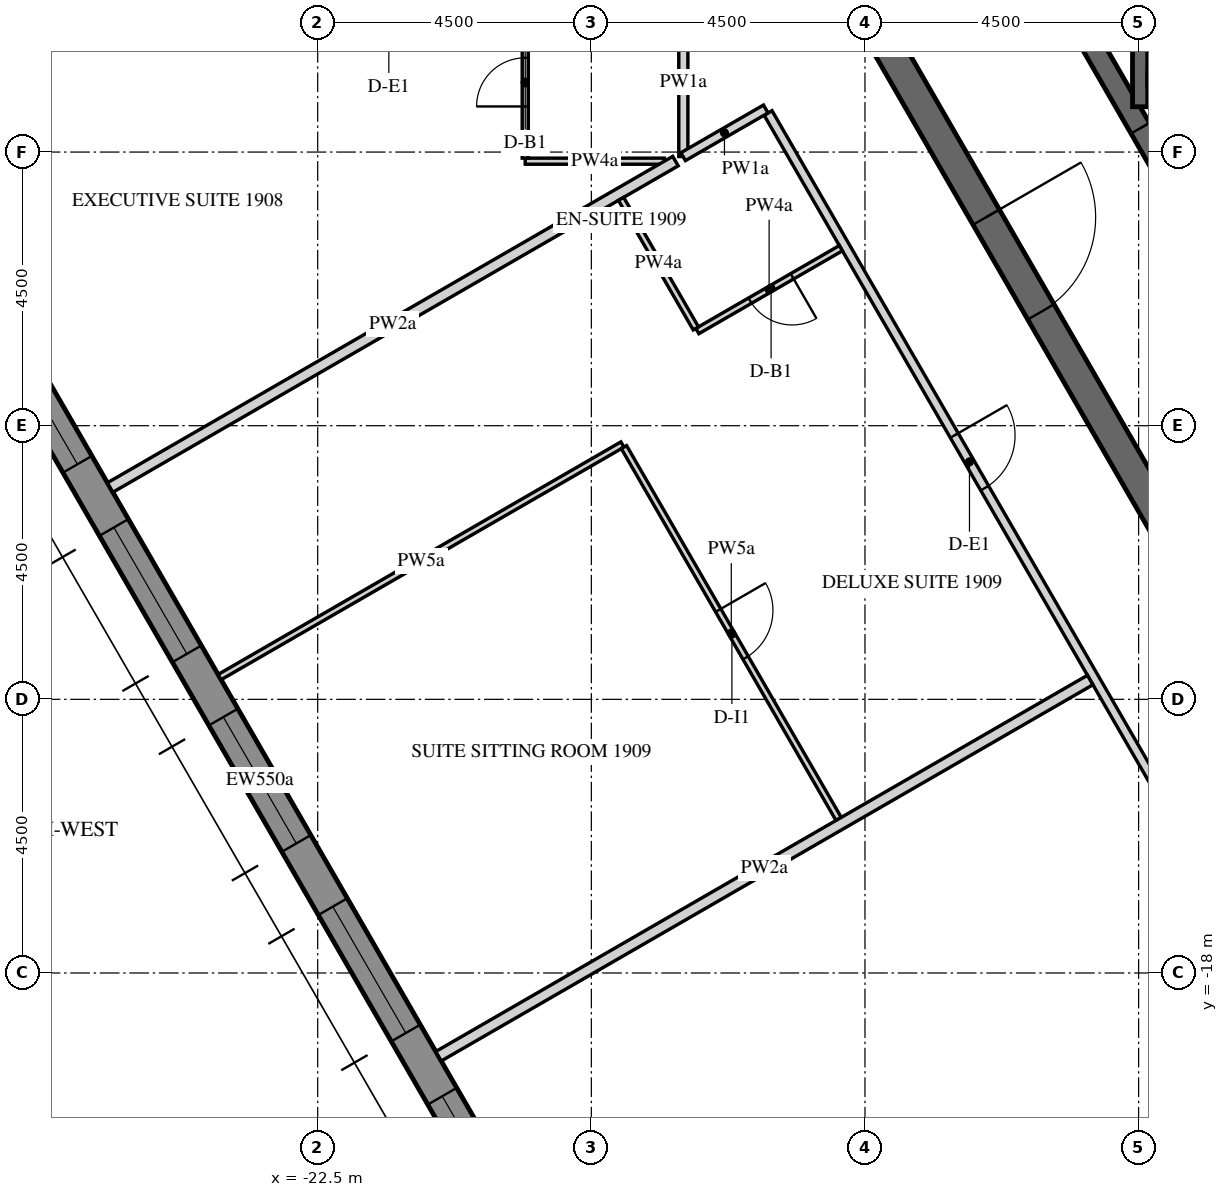
"""IFC4 building model, lengths in metres.
Left out: names, types, materials, properties, quantities, classifications, styles, units other than length and angle.
Written with IfcOpenShell. Run it as: python <this file> out.ifc"""

import sys

from ifc_helpers import new_model, si_unit, direction, frame, frame_2d, origin, place, context, subcontext, project, spatial, polyline, rectangle, outline, extrude, element, fill, save


model = new_model("IFC4")
c1 = context("Model", 3, precision=1e-05, world=origin(), true_north=direction((0.0, 1.0)))
c2 = subcontext(c1, "Body", "Model", "MODEL_VIEW")
j1 = project(units=[si_unit("LENGTHUNIT", "METRE"), si_unit("PLANEANGLEUNIT", "RADIAN")], contexts=[c1])
p1 = place(None, origin())
s1 = spatial("IfcSite", under=j1, at=p1, CompositionType="ELEMENT")
p2 = place(p1, origin())
s2 = spatial("IfcBuilding", under=s1, at=p2, CompositionType="ELEMENT")
p3 = place(p2, frame((0.0, 0.0, 246.3)))
s3 = spatial("IfcBuildingStorey", under=s2, at=p3, CompositionType="ELEMENT", Elevation=246.3)
p4 = place(p3, frame((-30.391, -2.811, -0.15), z_axis=(0.0, 0.0, 1.0), x_axis=(0.499998569178, -0.866026229868, 0.0)))
e1 = element("IfcWall", 1, at=p4, inside=s3, PredefinedType="SOLIDWALL", context=c2, shape_type="SweptSolid", body=[
    extrude(outline(polyline([(-0.022, -0.275), (27.783, -0.275), (27.732, 0.275), (0.022, 0.275), (-0.022, -0.275)])), origin(), (0.0, 0.0, 1.0), 3.75),
])
p5 = place(p4, frame((1.879, 0.0, 1.05)))
e2 = element("IfcOpeningElement", 2, at=p5, cuts=e1, PredefinedType="OPENING", context=c2, shape_type="SweptSolid", body=[
    extrude(rectangle(XDim=2.4, YDim=2.4, at=frame_2d((1.2, 1.2))), frame((0.0, 0.285, 0.0), z_axis=(0.0, -1.0, 0.0), x_axis=(1.0, 0.0, 0.0)), (0.0, 0.0, 1.0), 0.57),
])
p6 = place(p4, frame((5.479, 0.0, 1.05)))
e3 = element("IfcOpeningElement", 3, at=p6, cuts=e1, PredefinedType="OPENING", context=c2, shape_type="SweptSolid", body=[
    extrude(rectangle(XDim=2.4, YDim=2.4, at=frame_2d((1.2, 1.2))), frame((0.0, 0.285, 0.0), z_axis=(0.0, -1.0, 0.0), x_axis=(1.0, 0.0, 0.0)), (0.0, 0.0, 1.0), 0.57),
])
p7 = place(p4, frame((9.079, 0.0, 1.05)))
e4 = element("IfcOpeningElement", 4, at=p7, cuts=e1, PredefinedType="OPENING", context=c2, shape_type="SweptSolid", body=[
    extrude(rectangle(XDim=2.4, YDim=2.4, at=frame_2d((1.2, 1.2))), frame((0.0, 0.285, 0.0), z_axis=(0.0, -1.0, 0.0), x_axis=(1.0, 0.0, 0.0)), (0.0, 0.0, 1.0), 0.57),
])
p8 = place(p4, frame((12.679, 0.0, 1.05)))
e5 = element("IfcOpeningElement", 5, at=p8, cuts=e1, PredefinedType="OPENING", context=c2, shape_type="SweptSolid", body=[
    extrude(rectangle(XDim=2.4, YDim=2.4, at=frame_2d((1.2, 1.2))), frame((0.0, 0.285, 0.0), z_axis=(0.0, -1.0, 0.0), x_axis=(1.0, 0.0, 0.0)), (0.0, 0.0, 1.0), 0.57),
])
p9 = place(p4, frame((16.279, 0.0, 1.05)))
e6 = element("IfcOpeningElement", 6, at=p9, cuts=e1, PredefinedType="OPENING", context=c2, shape_type="SweptSolid", body=[
    extrude(rectangle(XDim=2.4, YDim=2.4, at=frame_2d((1.2, 1.2))), frame((0.0, 0.285, 0.0), z_axis=(0.0, -1.0, 0.0), x_axis=(1.0, 0.0, 0.0)), (0.0, 0.0, 1.0), 0.57),
])
p10 = place(p4, frame((19.879, 0.0, 1.05)))
e7 = element("IfcOpeningElement", 7, at=p10, cuts=e1, PredefinedType="OPENING", context=c2, shape_type="SweptSolid", body=[
    extrude(rectangle(XDim=2.4, YDim=2.4, at=frame_2d((1.2, 1.2))), frame((0.0, 0.285, 0.0), z_axis=(0.0, -1.0, 0.0), x_axis=(1.0, 0.0, 0.0)), (0.0, 0.0, 1.0), 0.57),
])
p11 = place(p4, frame((23.479, 0.0, 1.05)))
e8 = element("IfcOpeningElement", 8, at=p11, cuts=e1, PredefinedType="OPENING", context=c2, shape_type="SweptSolid", body=[
    extrude(rectangle(XDim=2.4, YDim=2.4, at=frame_2d((1.2, 1.2))), frame((0.0, 0.285, 0.0), z_axis=(0.0, -1.0, 0.0), x_axis=(1.0, 0.0, 0.0)), (0.0, 0.0, 1.0), 0.57),
])
p12 = place(p3, frame((-14.722, 0.0, -0.15), z_axis=(0.0, 0.0, 1.0), x_axis=(0.50000571537, -0.866022103989, 0.0)))
e9 = element("IfcWall", 9, at=p12, inside=s3, PredefinedType="SHEAR", context=c2, shape_type="SweptSolid", body=[
    extrude(outline(polyline([(-0.144, -0.25), (14.867, -0.25), (14.578, 0.25), (0.144, 0.25), (-0.144, -0.25)])), origin(), (0.0, 0.0, 1.0), 3.75),
])
p13 = place(p12, frame((6.432, 0.0, 0.15)))
e10 = element("IfcOpeningElement", 10, at=p13, cuts=e9, PredefinedType="OPENING", context=c2, shape_type="SweptSolid", body=[
    extrude(rectangle(XDim=1.8, YDim=2.4, at=frame_2d((0.9, 1.2))), frame((0.0, 0.26, 0.0), z_axis=(0.0, -1.0, 0.0), x_axis=(1.0, 0.0, 0.0)), (0.0, 0.0, 1.0), 0.52),
])
p14 = place(p3, frame((-11.345, 0.0, -0.15), z_axis=(0.0, 0.0, 1.0), x_axis=(0.499995046907, -0.866028263435, 0.0)))
e11 = element("IfcWall", 11, at=p14, inside=s3, PredefinedType="SHEAR", context=c2, shape_type="SweptSolid", body=[
    extrude(outline(polyline([(-0.101, -0.175), (11.446, -0.175), (11.244, 0.175), (0.101, 0.175), (-0.101, -0.175)])), origin(), (0.0, 0.0, 1.0), 3.75),
])
p15 = place(p14, frame((4.744, 0.0, 0.15)))
e12 = element("IfcOpeningElement", 12, at=p15, cuts=e11, PredefinedType="OPENING", context=c2, shape_type="SweptSolid", body=[
    extrude(rectangle(XDim=1.8, YDim=2.4, at=frame_2d((0.9, 1.2))), frame((0.0, 0.185, 0.0), z_axis=(0.0, -1.0, 0.0), x_axis=(1.0, 0.0, 0.0)), (0.0, 0.0, 1.0), 0.37),
])
p16 = place(p3, frame((-8.975, -3.755, -0.25), z_axis=(0.0, 0.0, 1.0), x_axis=(0.0, 1.0, 0.0)))
e13 = element("IfcWall", 13, at=p16, inside=s3, PredefinedType="SHEAR", context=c2, shape_type="SweptSolid", body=[
    extrude(rectangle(XDim=7.51, YDim=0.25, at=frame_2d((3.755, 0.0))), origin(), (0.0, 0.0, 1.0), 3.9),
])
p17 = place(p3, frame((-8.85, -3.3, -0.25), z_axis=(0.0, 0.0, 1.0), x_axis=(1.0, 0.0, 0.0)))
e14 = element("IfcWall", 14, at=p17, inside=s3, PredefinedType="SHEAR", context=c2, shape_type="SweptSolid", body=[
    extrude(rectangle(XDim=2.95, YDim=0.2, at=frame_2d((1.475, 0.0))), origin(), (0.0, 0.0, 1.0), 3.9),
])
p18 = place(p17, frame((0.875, 0.0, 0.25)))
e15 = element("IfcOpeningElement", 15, at=p18, cuts=e14, PredefinedType="OPENING", context=c2, shape_type="SweptSolid", body=[
    extrude(rectangle(XDim=1.2, YDim=2.4, at=frame_2d((0.6, 1.2))), frame((0.0, 0.11, 0.0), z_axis=(0.0, -1.0, 0.0), x_axis=(1.0, 0.0, 0.0)), (0.0, 0.0, 1.0), 0.22),
])
p19 = place(p3, frame((-16.487, -2.125, 0.0), z_axis=(0.0, 0.0, 1.0), x_axis=(0.0, -1.0, 0.0)))
e16 = element("IfcWall", 16, at=p19, inside=s3, PredefinedType="PARTITIONING", context=c2, shape_type="SweptSolid", body=[
    extrude(rectangle(XDim=2.449, YDim=0.15, at=frame_2d((1.225, 0.0))), origin(), (0.0, 0.0, 1.0), 2.838),
])
p20 = place(p3, frame((-15.094, -3.856, 0.0), z_axis=(0.0, 0.0, 1.0), x_axis=(0.500006037985, -0.866021917724, 0.0)))
e17 = element("IfcWall", 17, at=p20, inside=s3, PredefinedType="PARTITIONING", context=c2, shape_type="SweptSolid", body=[
    extrude(rectangle(XDim=12.867, YDim=0.15, at=frame_2d((6.434, 0.0))), origin(), (0.0, 0.0, 1.0), 2.838),
])
p21 = place(p20, frame((6.125, 0.0, 0.0)))
e18 = element("IfcOpeningElement", 18, at=p21, cuts=e17, PredefinedType="OPENING", context=c2, shape_type="SweptSolid", body=[
    extrude(rectangle(XDim=1.0, YDim=2.1, at=frame_2d((0.5, 1.05))), frame((0.0, 0.085, 0.0), z_axis=(0.0, -1.0, 0.0), x_axis=(1.0, 0.0, 0.0)), (0.0, 0.0, 1.0), 0.17),
])
p22 = place(p3, frame((-16.49, -4.576, 0.0), z_axis=(0.0, 0.0, 1.0), x_axis=(0.865993845424, 0.5000546567, 0.0)))
e19 = element("IfcWall", 19, at=p22, inside=s3, PredefinedType="PARTITIONING", context=c2, shape_type="SweptSolid", body=[
    extrude(rectangle(XDim=1.569, YDim=0.15, at=frame_2d((0.785, 0.0))), origin(), (0.0, 0.0, 1.0), 2.838),
])
p23 = place(p3, frame((-16.798, -4.65, 0.0), z_axis=(0.0, 0.0, 1.0), x_axis=(-1.0, 0.0, 0.0)))
e20 = element("IfcWall", 20, at=p23, inside=s3, PredefinedType="PARTITIONING", context=c2, shape_type="SweptSolid", body=[
    extrude(rectangle(XDim=2.289, YDim=0.1, at=frame_2d((1.144, 0.0))), origin(), (0.0, 0.0, 1.0), 2.838),
])
p24 = place(p3, frame((-19.087, -4.6, 0.0), z_axis=(0.0, 0.0, 1.0), x_axis=(0.0, 1.0, 0.0)))
e21 = element("IfcWall", 21, at=p24, inside=s3, PredefinedType="PARTITIONING", context=c2, shape_type="SweptSolid", body=[
    extrude(rectangle(XDim=2.475, YDim=0.1, at=frame_2d((1.238, 0.0))), origin(), (0.0, 0.0, 1.0), 2.838),
])
p25 = place(p24, frame((0.85, 0.0, 0.0)))
e22 = element("IfcOpeningElement", 22, at=p25, cuts=e21, PredefinedType="OPENING", context=c2, shape_type="SweptSolid", body=[
    extrude(rectangle(XDim=0.8, YDim=2.1, at=frame_2d((0.4, 1.05))), frame((0.0, 0.06, 0.0), z_axis=(0.0, -1.0, 0.0), x_axis=(1.0, 0.0, 0.0)), (0.0, 0.0, 1.0), 0.12),
])
p26 = place(p3, frame((-25.914, -10.017, 0.0), z_axis=(0.0, 0.0, 1.0), x_axis=(0.86602614826, 0.499998710529, 0.0)))
e23 = element("IfcWall", 23, at=p26, inside=s3, PredefinedType="PARTITIONING", context=c2, shape_type="SweptSolid", body=[
    extrude(rectangle(XDim=10.735, YDim=0.18, at=frame_2d((5.368, 0.0))), origin(), (0.0, 0.0, 1.0), 2.838),
])
p27 = place(p3, frame((-13.896, -6.081, 0.0), z_axis=(0.0, 0.0, 1.0), x_axis=(-0.866012511928, -0.500022328685, 0.0)))
e24 = element("IfcWall", 24, at=p27, inside=s3, PredefinedType="PARTITIONING", context=c2, shape_type="SweptSolid", body=[
    extrude(rectangle(XDim=2.725, YDim=0.1, at=frame_2d((1.363, 0.0))), origin(), (0.0, 0.0, 1.0), 2.838),
])
p28 = place(p27, frame((0.925, 0.0, 0.0)))
e25 = element("IfcOpeningElement", 25, at=p28, cuts=e24, PredefinedType="OPENING", context=c2, shape_type="SweptSolid", body=[
    extrude(rectangle(XDim=0.8, YDim=2.1, at=frame_2d((0.4, 1.05))), frame((0.0, 0.06, 0.0), z_axis=(0.0, -1.0, 0.0), x_axis=(1.0, 0.0, 0.0)), (0.0, 0.0, 1.0), 0.12),
])
p29 = place(p3, frame((-16.281, -7.4, 0.0), z_axis=(0.0, 0.0, 1.0), x_axis=(-0.500003092839, 0.866023618125, 0.0)))
e26 = element("IfcWall", 26, at=p29, inside=s3, PredefinedType="PARTITIONING", context=c2, shape_type="SweptSolid", body=[
    extrude(rectangle(XDim=2.46, YDim=0.1, at=frame_2d((1.23, 0.0))), origin(), (0.0, 0.0, 1.0), 2.838),
])
p30 = place(p3, frame((-24.114, -13.134, 0.0), z_axis=(0.0, 0.0, 1.0), x_axis=(0.866033062874, 0.499986733834, 0.0)))
e27 = element("IfcWall", 27, at=p30, inside=s3, PredefinedType="PARTITIONING", context=c2, shape_type="SweptSolid", body=[
    extrude(rectangle(XDim=7.65, YDim=0.1, at=frame_2d((3.825, 0.0))), origin(), (0.0, 0.0, 1.0), 2.838),
])
p31 = place(p3, frame((-17.463, -9.353, 0.0), z_axis=(0.0, 0.0, 1.0), x_axis=(0.499995846692, -0.866027801685, 0.0)))
e28 = element("IfcWall", 28, at=p31, inside=s3, PredefinedType="PARTITIONING", context=c2, shape_type="SweptSolid", body=[
    extrude(rectangle(XDim=7.06, YDim=0.1, at=frame_2d((3.53, 0.0))), origin(), (0.0, 0.0, 1.0), 2.838),
])
p32 = place(p31, frame((3.1, 0.0, 0.0)))
e29 = element("IfcOpeningElement", 29, at=p32, cuts=e28, PredefinedType="OPENING", context=c2, shape_type="SweptSolid", body=[
    extrude(rectangle(XDim=0.9, YDim=2.1, at=frame_2d((0.45, 1.05))), frame((0.0, 0.06, 0.0), z_axis=(0.0, -1.0, 0.0), x_axis=(1.0, 0.0, 0.0)), (0.0, 0.0, 1.0), 0.12),
])
p33 = place(p3, frame((-20.513, -19.37, 0.0), z_axis=(0.0, 0.0, 1.0), x_axis=(0.866024931941, 0.500000817256, 0.0)))
e30 = element("IfcWall", 30, at=p33, inside=s3, PredefinedType="PARTITIONING", context=c2, shape_type="SweptSolid", body=[
    extrude(rectangle(XDim=12.375, YDim=0.18, at=frame_2d((6.188, 0.0))), origin(), (0.0, 0.0, 1.0), 2.838),
])
p34 = place(p6, frame((0.0, 0.205, 0.0)))
e31 = element("IfcWindow", 31, at=p34, inside=s3, PartitioningType="DOUBLE_PANEL_VERTICAL", PredefinedType="WINDOW", context=c2, shape_type="SweptSolid", body=[
    extrude(rectangle(XDim=2.4, YDim=2.4, at=frame_2d((1.2, 1.2))), frame((0.0, 0.03, 0.0), z_axis=(0.0, -1.0, 0.0), x_axis=(1.0, 0.0, 0.0)), (0.0, 0.0, 1.0), 0.06),
])
fill(e3, e31)
p35 = place(p7, frame((0.0, 0.205, 0.0)))
e32 = element("IfcWindow", 32, at=p35, inside=s3, PartitioningType="DOUBLE_PANEL_VERTICAL", PredefinedType="WINDOW", context=c2, shape_type="SweptSolid", body=[
    extrude(rectangle(XDim=2.4, YDim=2.4, at=frame_2d((1.2, 1.2))), frame((0.0, 0.03, 0.0), z_axis=(0.0, -1.0, 0.0), x_axis=(1.0, 0.0, 0.0)), (0.0, 0.0, 1.0), 0.06),
])
fill(e4, e32)
p36 = place(p8, frame((0.0, 0.205, 0.0)))
e33 = element("IfcWindow", 33, at=p36, inside=s3, PartitioningType="DOUBLE_PANEL_VERTICAL", PredefinedType="WINDOW", context=c2, shape_type="SweptSolid", body=[
    extrude(rectangle(XDim=2.4, YDim=2.4, at=frame_2d((1.2, 1.2))), frame((0.0, 0.03, 0.0), z_axis=(0.0, -1.0, 0.0), x_axis=(1.0, 0.0, 0.0)), (0.0, 0.0, 1.0), 0.06),
])
fill(e5, e33)
p37 = place(p9, frame((0.0, 0.205, 0.0)))
e34 = element("IfcWindow", 34, at=p37, inside=s3, PartitioningType="DOUBLE_PANEL_VERTICAL", PredefinedType="WINDOW", context=c2, shape_type="SweptSolid", body=[
    extrude(rectangle(XDim=2.4, YDim=2.4, at=frame_2d((1.2, 1.2))), frame((0.0, 0.03, 0.0), z_axis=(0.0, -1.0, 0.0), x_axis=(1.0, 0.0, 0.0)), (0.0, 0.0, 1.0), 0.06),
])
fill(e6, e34)
p38 = place(p10, frame((0.0, 0.205, 0.0)))
e35 = element("IfcWindow", 35, at=p38, inside=s3, PartitioningType="DOUBLE_PANEL_VERTICAL", PredefinedType="WINDOW", context=c2, shape_type="SweptSolid", body=[
    extrude(rectangle(XDim=2.4, YDim=2.4, at=frame_2d((1.2, 1.2))), frame((0.0, 0.03, 0.0), z_axis=(0.0, -1.0, 0.0), x_axis=(1.0, 0.0, 0.0)), (0.0, 0.0, 1.0), 0.06),
])
fill(e7, e35)
p39 = place(p13, origin())
e36 = element("IfcDoor", 36, at=p39, inside=s3, OperationType="DOUBLE_DOOR_SINGLE_SWING", PredefinedType="DOOR", context=c2, shape_type="SweptSolid", body=[
    extrude(rectangle(XDim=1.8, YDim=2.4, at=frame_2d((0.9, 1.2))), frame((0.0, 0.025, 0.0), z_axis=(0.0, -1.0, 0.0), x_axis=(1.0, 0.0, 0.0)), (0.0, 0.0, 1.0), 0.05),
])
fill(e10, e36)
p40 = place(p15, origin())
e37 = element("IfcDoor", 37, at=p40, inside=s3, OperationType="DOUBLE_DOOR_SINGLE_SWING", PredefinedType="DOOR", context=c2, shape_type="SweptSolid", body=[
    extrude(rectangle(XDim=1.8, YDim=2.4, at=frame_2d((0.9, 1.2))), frame((0.0, 0.025, 0.0), z_axis=(0.0, -1.0, 0.0), x_axis=(1.0, 0.0, 0.0)), (0.0, 0.0, 1.0), 0.05),
])
fill(e12, e37)
p41 = place(p25, origin())
e38 = element("IfcDoor", 38, at=p41, inside=s3, OperationType="SINGLE_SWING_RIGHT", PredefinedType="DOOR", context=c2, shape_type="SweptSolid", body=[
    extrude(rectangle(XDim=0.8, YDim=2.1, at=frame_2d((0.4, 1.05))), frame((0.0, 0.025, 0.0), z_axis=(0.0, -1.0, 0.0), x_axis=(1.0, 0.0, 0.0)), (0.0, 0.0, 1.0), 0.05),
])
fill(e22, e38)
p42 = place(p21, origin())
e39 = element("IfcDoor", 39, at=p42, inside=s3, OperationType="SINGLE_SWING_LEFT", PredefinedType="DOOR", context=c2, shape_type="SweptSolid", body=[
    extrude(rectangle(XDim=1.0, YDim=2.1, at=frame_2d((0.5, 1.05))), frame((0.0, 0.025, 0.0), z_axis=(0.0, -1.0, 0.0), x_axis=(1.0, 0.0, 0.0)), (0.0, 0.0, 1.0), 0.05),
])
fill(e18, e39)
p43 = place(p28, origin())
e40 = element("IfcDoor", 40, at=p43, inside=s3, OperationType="SINGLE_SWING_RIGHT", PredefinedType="DOOR", context=c2, shape_type="SweptSolid", body=[
    extrude(rectangle(XDim=0.8, YDim=2.1, at=frame_2d((0.4, 1.05))), frame((0.0, 0.025, 0.0), z_axis=(0.0, -1.0, 0.0), x_axis=(1.0, 0.0, 0.0)), (0.0, 0.0, 1.0), 0.05),
])
fill(e25, e40)
p44 = place(p32, origin())
e41 = element("IfcDoor", 41, at=p44, inside=s3, OperationType="SINGLE_SWING_RIGHT", PredefinedType="DOOR", context=c2, shape_type="SweptSolid", body=[
    extrude(rectangle(XDim=0.9, YDim=2.1, at=frame_2d((0.45, 1.05))), frame((0.0, 0.025, 0.0), z_axis=(0.0, -1.0, 0.0), x_axis=(1.0, 0.0, 0.0)), (0.0, 0.0, 1.0), 0.05),
])
fill(e29, e41)
save(model, sys.argv[1])
